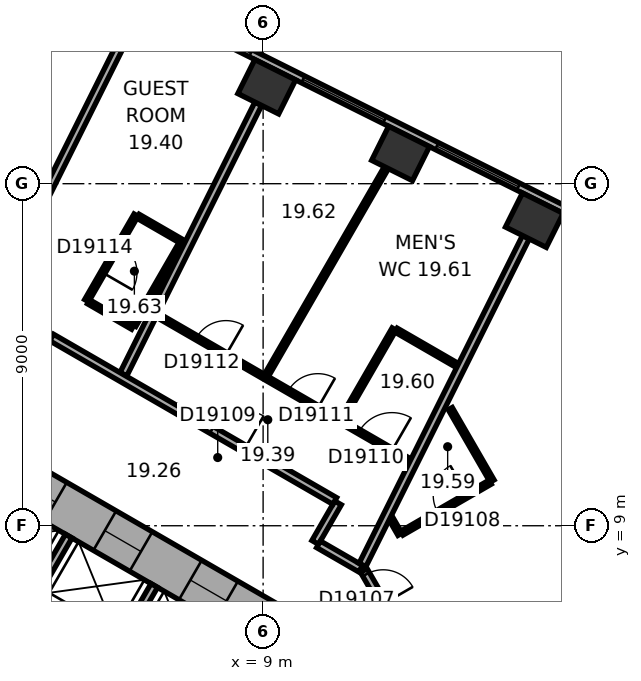
"""IFC4 building model, lengths in metres.
Left out: names, types, materials, properties, quantities, classifications, styles, units other than length and angle.
Written with IfcOpenShell. Run it as: python <this file> out.ifc"""

import sys

from ifc_helpers import new_model, si_unit, direction, frame, frame_2d, origin, origin_2d, place, context, subcontext, project, spatial, rectangle, extrude, element, fill, save


model = new_model("IFC4")
c1 = context("Model", 3, precision=1e-05, world=origin(), true_north=direction((0.0, 1.0)))
c2 = subcontext(c1, "Body", "Model", "MODEL_VIEW")
j1 = project(units=[si_unit("LENGTHUNIT", "METRE"), si_unit("PLANEANGLEUNIT", "RADIAN")], contexts=[c1])
p1 = place(None, origin())
s1 = spatial("IfcSite", under=j1, at=p1, CompositionType="ELEMENT")
p2 = place(p1, origin())
s2 = spatial("IfcBuilding", under=s1, at=p2, CompositionType="ELEMENT")
p3 = place(p2, frame((0.0, 0.0, 86.9)))
s3 = spatial("IfcBuildingStorey", under=s2, at=p3, CompositionType="ELEMENT", Elevation=86.9)
for number, where, z_axis, x_axis in (
    (1, (16.138, 17.04, 0.0), (0.0, 0.0, 1.0), (-0.895, 0.446, 0.0)),
    (2, (12.616, 18.795, 0.0), (0.0, 0.0, 1.0), (-0.895, 0.446, 0.0)),
    (3, (9.095, 20.551, 0.0), (0.0, 0.0, 1.0), (-0.895, 0.446, 0.0)),
):
    element("IfcColumn", number, at=place(p3, frame(where, z_axis=z_axis, x_axis=x_axis)), inside=s3, PredefinedType="COLUMN", context=c2, shape_type="SweptSolid", body=[
        extrude(rectangle(XDim=1.2, YDim=1.0, at=origin_2d()), origin(), (0.0, 0.0, 1.0), 3.3),
    ])
p4 = place(p3, frame((10.4, 5.658, 0.0), z_axis=(0.0, 0.0, 1.0), x_axis=(-0.866021384402, 0.500006961711, 0.0)))
e4 = element("IfcWall", 4, at=p4, inside=s3, PredefinedType="SHEAR", context=c2, shape_type="SweptSolid", body=[
    extrude(rectangle(XDim=12.355, YDim=1.2, at=frame_2d((6.178, 0.0))), origin(), (0.0, 0.0, 1.0), 3.3),
])
p5 = place(p4, frame((2.728, 0.0, 0.0)))
e5 = element("IfcOpeningElement", 5, at=p5, cuts=e4, PredefinedType="OPENING", context=c2, shape_type="SweptSolid", body=[
    extrude(rectangle(XDim=1.1, YDim=2.1, at=frame_2d((0.55, 1.05))), frame((0.0, 0.61, 0.0), z_axis=(0.0, -1.0, 0.0), x_axis=(1.0, 0.0, 0.0)), (0.0, 0.0, 1.0), 1.22),
])
p6 = place(p4, frame((5.328, 0.0, 0.0)))
e6 = element("IfcOpeningElement", 6, at=p6, cuts=e4, PredefinedType="OPENING", context=c2, shape_type="SweptSolid", body=[
    extrude(rectangle(XDim=1.1, YDim=2.1, at=frame_2d((0.55, 1.05))), frame((0.0, 0.61, 0.0), z_axis=(0.0, -1.0, 0.0), x_axis=(1.0, 0.0, 0.0)), (0.0, 0.0, 1.0), 1.22),
])
p7 = place(p4, frame((7.928, 0.0, 0.0)))
e7 = element("IfcOpeningElement", 7, at=p7, cuts=e4, PredefinedType="OPENING", context=c2, shape_type="SweptSolid", body=[
    extrude(rectangle(XDim=1.1, YDim=2.1, at=frame_2d((0.55, 1.05))), frame((0.0, 0.61, 0.0), z_axis=(0.0, -1.0, 0.0), x_axis=(1.0, 0.0, 0.0)), (0.0, 0.0, 1.0), 1.22),
])
p8 = place(p3, frame((20.63, 15.47, 0.0), z_axis=(0.0, 0.0, 1.0), x_axis=(-0.894934518609, 0.446197498203, 0.0)))
e8 = element("IfcWall", 8, at=p8, inside=s3, PredefinedType="STANDARD", context=c2, shape_type="SweptSolid", body=[
    extrude(rectangle(XDim=21.246, YDim=0.2, at=frame_2d((10.623, 0.0))), origin(), (0.0, 0.0, 1.0), 3.3),
])
p9 = place(p8, frame((1.553, 0.0, 0.8)))
e9 = element("IfcOpeningElement", 9, at=p9, cuts=e8, PredefinedType="OPENING", context=c2, shape_type="SweptSolid", body=[
    extrude(rectangle(XDim=2.4, YDim=1.7, at=frame_2d((1.2, 0.85))), frame((0.0, 0.11, 0.0), z_axis=(0.0, -1.0, 0.0), x_axis=(1.0, 0.0, 0.0)), (0.0, 0.0, 1.0), 0.22),
])
p10 = place(p8, frame((5.488, 0.0, 0.8)))
e10 = element("IfcOpeningElement", 10, at=p10, cuts=e8, PredefinedType="OPENING", context=c2, shape_type="SweptSolid", body=[
    extrude(rectangle(XDim=2.4, YDim=1.7, at=frame_2d((1.2, 0.85))), frame((0.0, 0.11, 0.0), z_axis=(0.0, -1.0, 0.0), x_axis=(1.0, 0.0, 0.0)), (0.0, 0.0, 1.0), 0.22),
])
p11 = place(p8, frame((9.422, 0.0, 0.8)))
e11 = element("IfcOpeningElement", 11, at=p11, cuts=e8, PredefinedType="OPENING", context=c2, shape_type="SweptSolid", body=[
    extrude(rectangle(XDim=2.4, YDim=1.7, at=frame_2d((1.2, 0.85))), frame((0.0, 0.11, 0.0), z_axis=(0.0, -1.0, 0.0), x_axis=(1.0, 0.0, 0.0)), (0.0, 0.0, 1.0), 0.22),
])
p12 = place(p8, frame((13.357, 0.0, 0.8)))
e12 = element("IfcOpeningElement", 12, at=p12, cuts=e8, PredefinedType="OPENING", context=c2, shape_type="SweptSolid", body=[
    extrude(rectangle(XDim=2.4, YDim=1.7, at=frame_2d((1.2, 0.85))), frame((0.0, 0.11, 0.0), z_axis=(0.0, -1.0, 0.0), x_axis=(1.0, 0.0, 0.0)), (0.0, 0.0, 1.0), 0.22),
])
p13 = place(p8, frame((17.292, 0.0, 0.8)))
e13 = element("IfcOpeningElement", 13, at=p13, cuts=e8, PredefinedType="OPENING", context=c2, shape_type="SweptSolid", body=[
    extrude(rectangle(XDim=2.4, YDim=1.7, at=frame_2d((1.2, 0.85))), frame((0.0, 0.11, 0.0), z_axis=(0.0, -1.0, 0.0), x_axis=(1.0, 0.0, 0.0)), (0.0, 0.0, 1.0), 0.22),
])
p14 = place(p3, frame((7.424, 4.259, 0.0), z_axis=(0.0, 0.0, 1.0), x_axis=(-0.866026010844, 0.49999894854, 0.0)))
e14 = element("IfcWall", 14, at=p14, inside=s3, PredefinedType="PARTITIONING", context=c2, shape_type="SweptSolid", body=[
    extrude(rectangle(XDim=8.0, YDim=0.2, at=frame_2d((4.0, 0.0))), origin(), (0.0, 0.0, 1.0), 3.05),
])
for number, where, z_axis, x_axis in (
    (15, (5.036, 5.522, 0.0), (0.0, 0.0, 1.0), (0.5, 0.866, 0.0)),
    (16, (2.784, 6.822, 0.0), (0.0, 0.0, 1.0), (0.5, 0.866, 0.0)),
):
    element("IfcWall", number, at=place(p3, frame(where, z_axis=z_axis, x_axis=x_axis)), inside=s3, PredefinedType="PARTITIONING", context=c2, shape_type="SweptSolid", body=[
        extrude(rectangle(XDim=2.2, YDim=0.2, at=frame_2d((1.1, 0.0))), origin(), (0.0, 0.0, 1.0), 3.05),
    ])
p15 = place(p3, frame((6.303, 4.617, 0.0), z_axis=(0.0, 0.0, 1.0), x_axis=(-0.866027801685, 0.499995846692, 0.0)))
e17 = element("IfcWall", 17, at=p15, inside=s3, PredefinedType="SHEAR", context=c2, shape_type="SweptSolid", body=[
    extrude(rectangle(XDim=7.06, YDim=0.3, at=frame_2d((3.53, 0.0))), origin(), (0.0, 0.0, 1.0), 3.05),
])
p16 = place(p3, frame((4.356, 14.922, 0.0), z_axis=(0.0, 0.0, 1.0), x_axis=(0.499936506574, 0.866062058628, 0.0)))
e18 = element("IfcWall", 18, at=p16, inside=s3, PredefinedType="PARTITIONING", context=c2, shape_type="SweptSolid", body=[
    extrude(rectangle(XDim=2.6, YDim=0.12, at=frame_2d((1.3, 0.0))), origin(), (0.0, 0.0, 1.0), 3.05),
])
p17 = place(p16, frame((0.85, 0.0, 0.0)))
e19 = element("IfcOpeningElement", 19, at=p17, cuts=e18, PredefinedType="OPENING", context=c2, shape_type="SweptSolid", body=[
    extrude(rectangle(XDim=0.9, YDim=2.1, at=frame_2d((0.45, 1.05))), frame((0.0, 0.07, 0.0), z_axis=(0.0, -1.0, 0.0), x_axis=(1.0, 0.0, 0.0)), (0.0, 0.0, 1.0), 0.14),
])
p18 = place(p3, frame((5.351, 21.859, 0.0), z_axis=(0.0, 0.0, 1.0), x_axis=(-0.446205309328, -0.894930624086, 0.0)))
e20 = element("IfcWall", 20, at=p18, inside=s3, PredefinedType="PARTITIONING", context=c2, shape_type="SweptSolid", body=[
    extrude(rectangle(XDim=8.913, YDim=0.2, at=frame_2d((4.457, 0.0))), origin(), (0.0, 0.0, 1.0), 2.6),
])
p19 = place(p3, frame((5.569, 14.222, 0.0), z_axis=(0.0, 0.0, 1.0), x_axis=(-0.866036909293, 0.499980071345, 0.0)))
e21 = element("IfcWall", 21, at=p19, inside=s3, PredefinedType="PARTITIONING", context=c2, shape_type="SweptSolid", body=[
    extrude(rectangle(XDim=1.34, YDim=0.12, at=frame_2d((0.67, 0.0))), origin(), (0.0, 0.0, 1.0), 3.05),
])
p20 = place(p3, frame((5.708, 17.144, 0.0), z_axis=(0.0, 0.0, 1.0), x_axis=(0.866082447003, -0.499901185229, 0.0)))
e22 = element("IfcWall", 22, at=p20, inside=s3, PredefinedType="PARTITIONING", context=c2, shape_type="SweptSolid", body=[
    extrude(rectangle(XDim=1.34, YDim=0.12, at=frame_2d((0.67, 0.0))), origin(), (0.0, 0.0, 1.0), 3.05),
])
p21 = place(p3, frame((6.839, 16.422, 0.0), z_axis=(0.0, 0.0, 1.0), x_axis=(-0.50000366821, -0.866023285932, 0.0)))
e23 = element("IfcWall", 23, at=p21, inside=s3, PredefinedType="PARTITIONING", context=c2, shape_type="SweptSolid", body=[
    extrude(rectangle(XDim=2.48, YDim=0.12, at=frame_2d((1.24, 0.0))), origin(), (0.0, 0.0, 1.0), 3.05),
])
p22 = place(p3, frame((8.872, 20.104, 0.0), z_axis=(0.0, 0.0, 1.0), x_axis=(-0.446218378653, -0.894924107706, 0.0)))
e24 = element("IfcWall", 24, at=p22, inside=s3, PredefinedType="PARTITIONING", context=c2, shape_type="SweptSolid", body=[
    extrude(rectangle(XDim=7.95, YDim=0.2, at=frame_2d((3.975, 0.0))), origin(), (0.0, 0.0, 1.0), 3.05),
])
p23 = place(p3, frame((10.371, 8.561, 0.0), z_axis=(0.0, 0.0, 1.0), x_axis=(0.499986357472, 0.866033280158, 0.0)))
e25 = element("IfcWall", 25, at=p23, inside=s3, PredefinedType="PARTITIONING", context=c2, shape_type="SweptSolid", body=[
    extrude(rectangle(XDim=1.201, YDim=0.2, at=frame_2d((0.601, 0.0))), origin(), (0.0, 0.0, 1.0), 3.05),
])
p24 = place(p3, frame((10.885, 9.652, 0.0), z_axis=(0.0, 0.0, 1.0), x_axis=(-0.866033868542, 0.499985338323, 0.0)))
e26 = element("IfcWall", 26, at=p24, inside=s3, PredefinedType="PARTITIONING", context=c2, shape_type="SweptSolid", body=[
    extrude(rectangle(XDim=8.602, YDim=0.2, at=frame_2d((4.301, 0.0))), origin(), (0.0, 0.0, 1.0), 3.05),
])
p25 = place(p24, frame((2.739, 0.0, 0.0)))
e27 = element("IfcOpeningElement", 27, at=p25, cuts=e26, PredefinedType="OPENING", context=c2, shape_type="SweptSolid", body=[
    extrude(rectangle(XDim=1.0, YDim=2.1, at=frame_2d((0.5, 1.05))), frame((0.0, 0.11, 0.0), z_axis=(0.0, -1.0, 0.0), x_axis=(1.0, 0.0, 0.0)), (0.0, 0.0, 1.0), 0.22),
])
p26 = place(p3, frame((11.566, 7.871, 0.0), z_axis=(0.0, 0.0, 1.0), x_axis=(-0.866004557827, 0.500036104519, 0.0)))
e28 = element("IfcWall", 28, at=p26, inside=s3, PredefinedType="PARTITIONING", context=c2, shape_type="SweptSolid", body=[
    extrude(rectangle(XDim=1.28, YDim=0.2, at=frame_2d((0.64, 0.0))), origin(), (0.0, 0.0, 1.0), 3.05),
])
p27 = place(p3, frame((12.243, 18.423, 0.0), z_axis=(0.0, 0.0, 1.0), x_axis=(-0.499993523031, -0.866029143232, 0.0)))
e29 = element("IfcWall", 29, at=p27, inside=s3, PredefinedType="PARTITIONING", context=c2, shape_type="SweptSolid", body=[
    extrude(rectangle(XDim=6.315, YDim=0.12, at=frame_2d((3.157, 0.0))), origin(), (0.0, 0.0, 1.0), 2.6),
])
p28 = place(p3, frame((12.448, 14.177, 0.0), z_axis=(0.0, 0.0, 1.0), x_axis=(-0.500048966069, -0.865997131366, 0.0)))
e30 = element("IfcWall", 30, at=p28, inside=s3, PredefinedType="PARTITIONING", context=c2, shape_type="SweptSolid", body=[
    extrude(rectangle(XDim=2.74, YDim=0.12, at=frame_2d((1.37, 0.0))), origin(), (0.0, 0.0, 1.0), 3.05),
])
p29 = place(p3, frame((12.58, 6.212, 0.0), z_axis=(0.0, 0.0, 1.0), x_axis=(-0.500063286585, 0.865988862174, 0.0)))
e31 = element("IfcWall", 31, at=p29, inside=s3, PredefinedType="PARTITIONING", context=c2, shape_type="SweptSolid", body=[
    extrude(rectangle(XDim=1.86, YDim=0.2, at=frame_2d((0.93, 0.0))), origin(), (0.0, 0.0, 1.0), 3.05),
])
p30 = place(p29, frame((0.842, 0.0, 0.0)))
e32 = element("IfcOpeningElement", 32, at=p30, cuts=e31, PredefinedType="OPENING", context=c2, shape_type="SweptSolid", body=[
    extrude(rectangle(XDim=0.9, YDim=2.1, at=frame_2d((0.45, 1.05))), frame((0.0, 0.11, 0.0), z_axis=(0.0, -1.0, 0.0), x_axis=(1.0, 0.0, 0.0)), (0.0, 0.0, 1.0), 0.22),
])
p31 = place(p3, frame((12.601, 8.776, 0.0), z_axis=(0.0, 0.0, 1.0), x_axis=(-0.500166486798, 0.865929261247, 0.0)))
e33 = element("IfcWall", 33, at=p31, inside=s3, PredefinedType="PARTITIONING", context=c2, shape_type="SweptSolid", body=[
    extrude(rectangle(XDim=0.476, YDim=0.12, at=frame_2d((0.238, 0.0))), origin(), (0.0, 0.0, 1.0), 3.05),
])
p32 = place(p3, frame((12.866, 10.702, 0.0), z_axis=(0.0, 0.0, 1.0), x_axis=(-0.866023151433, 0.500003901167, 0.0)))
e34 = element("IfcWall", 34, at=p32, inside=s3, PredefinedType="PARTITIONING", context=c2, shape_type="SweptSolid", body=[
    extrude(rectangle(XDim=7.684, YDim=0.12, at=frame_2d((3.842, 0.0))), origin(), (0.0, 0.0, 1.0), 3.05),
])
p33 = place(p32, frame((0.55, 0.0, 0.0)))
e35 = element("IfcOpeningElement", 35, at=p33, cuts=e34, PredefinedType="OPENING", context=c2, shape_type="SweptSolid", body=[
    extrude(rectangle(XDim=1.0, YDim=2.1, at=frame_2d((0.5, 1.05))), frame((0.0, 0.07, 0.0), z_axis=(0.0, -1.0, 0.0), x_axis=(1.0, 0.0, 0.0)), (0.0, 0.0, 1.0), 0.14),
])
p34 = place(p32, frame((2.8, 0.0, 0.0)))
e36 = element("IfcOpeningElement", 36, at=p34, cuts=e34, PredefinedType="OPENING", context=c2, shape_type="SweptSolid", body=[
    extrude(rectangle(XDim=0.9, YDim=2.1, at=frame_2d((0.45, 1.05))), frame((0.0, 0.07, 0.0), z_axis=(0.0, -1.0, 0.0), x_axis=(1.0, 0.0, 0.0)), (0.0, 0.0, 1.0), 0.14),
])
p35 = place(p32, frame((5.592, 0.0, 0.0)))
e37 = element("IfcOpeningElement", 37, at=p35, cuts=e34, PredefinedType="OPENING", context=c2, shape_type="SweptSolid", body=[
    extrude(rectangle(XDim=0.9, YDim=2.1, at=frame_2d((0.45, 1.05))), frame((0.0, 0.07, 0.0), z_axis=(0.0, -1.0, 0.0), x_axis=(1.0, 0.0, 0.0)), (0.0, 0.0, 1.0), 0.14),
])
p36 = place(p3, frame((13.926, 12.081, 0.0), z_axis=(0.0, 0.0, 1.0), x_axis=(0.499994660107, -0.866028486751, 0.0)))
e38 = element("IfcWall", 38, at=p36, inside=s3, PredefinedType="PARTITIONING", context=c2, shape_type="SweptSolid", body=[
    extrude(rectangle(XDim=2.2, YDim=0.12, at=frame_2d((1.1, 0.0))), origin(), (0.0, 0.0, 1.0), 3.05),
])
p37 = place(p3, frame((14.118, 13.212, 0.0), z_axis=(0.0, 0.0, 1.0), x_axis=(-0.866039825209, 0.499975020527, 0.0)))
e39 = element("IfcWall", 39, at=p37, inside=s3, PredefinedType="PARTITIONING", context=c2, shape_type="SweptSolid", body=[
    extrude(rectangle(XDim=1.869, YDim=0.12, at=frame_2d((0.934, 0.0))), origin(), (0.0, 0.0, 1.0), 3.05),
])
p38 = place(p3, frame((14.974, 10.146, 0.0), z_axis=(0.0, 0.0, 1.0), x_axis=(-0.86599746015, -0.500048396672, 0.0)))
e40 = element("IfcWall", 40, at=p38, inside=s3, PredefinedType="PARTITIONING", context=c2, shape_type="SweptSolid", body=[
    extrude(rectangle(XDim=2.68, YDim=0.12, at=frame_2d((1.34, 0.0))), origin(), (0.0, 0.0, 1.0), 3.05),
])
p39 = place(p38, frame((0.69, 0.0, 0.0)))
e41 = element("IfcOpeningElement", 41, at=p39, cuts=e40, PredefinedType="OPENING", context=c2, shape_type="SweptSolid", body=[
    extrude(rectangle(XDim=0.9, YDim=2.1, at=frame_2d((0.45, 1.05))), frame((0.0, 0.07, 0.0), z_axis=(0.0, -1.0, 0.0), x_axis=(1.0, 0.0, 0.0)), (0.0, 0.0, 1.0), 0.14),
])
p40 = place(p3, frame((15.915, 16.592, 0.0), z_axis=(0.0, 0.0, 1.0), x_axis=(-0.446199736347, -0.894933402709, 0.0)))
e42 = element("IfcWall", 42, at=p40, inside=s3, PredefinedType="PARTITIONING", context=c2, shape_type="SweptSolid", body=[
    extrude(rectangle(XDim=9.635, YDim=0.2, at=frame_2d((4.817, 0.0))), origin(), (0.0, 0.0, 1.0), 3.05),
])
p41 = place(p10, origin())
e43 = element("IfcWindow", 43, at=p41, inside=s3, PartitioningType="SINGLE_PANEL", PredefinedType="WINDOW", context=c2, shape_type="SweptSolid", body=[
    extrude(rectangle(XDim=2.4, YDim=1.7, at=frame_2d((1.2, 0.85))), frame((0.0, 0.03, 0.0), z_axis=(0.0, -1.0, 0.0), x_axis=(1.0, 0.0, 0.0)), (0.0, 0.0, 1.0), 0.06),
])
fill(e10, e43)
p42 = place(p11, origin())
e44 = element("IfcWindow", 44, at=p42, inside=s3, PartitioningType="SINGLE_PANEL", PredefinedType="WINDOW", context=c2, shape_type="SweptSolid", body=[
    extrude(rectangle(XDim=2.4, YDim=1.7, at=frame_2d((1.2, 0.85))), frame((0.0, 0.03, 0.0), z_axis=(0.0, -1.0, 0.0), x_axis=(1.0, 0.0, 0.0)), (0.0, 0.0, 1.0), 0.06),
])
fill(e11, e44)
p43 = place(p12, origin())
e45 = element("IfcWindow", 45, at=p43, inside=s3, PartitioningType="SINGLE_PANEL", PredefinedType="WINDOW", context=c2, shape_type="SweptSolid", body=[
    extrude(rectangle(XDim=2.4, YDim=1.7, at=frame_2d((1.2, 0.85))), frame((0.0, 0.03, 0.0), z_axis=(0.0, -1.0, 0.0), x_axis=(1.0, 0.0, 0.0)), (0.0, 0.0, 1.0), 0.06),
])
fill(e12, e45)
p44 = place(p5, origin())
e46 = element("IfcDoor", 46, at=p44, inside=s3, OperationType="DOUBLE_DOOR_SLIDING", PredefinedType="DOOR", context=c2, shape_type="SweptSolid", body=[
    extrude(rectangle(XDim=1.1, YDim=2.1, at=frame_2d((0.55, 1.05))), frame((0.0, 0.025, 0.0), z_axis=(0.0, -1.0, 0.0), x_axis=(1.0, 0.0, 0.0)), (0.0, 0.0, 1.0), 0.05),
])
fill(e5, e46)
p45 = place(p6, origin())
e47 = element("IfcDoor", 47, at=p45, inside=s3, OperationType="DOUBLE_DOOR_SLIDING", PredefinedType="DOOR", context=c2, shape_type="SweptSolid", body=[
    extrude(rectangle(XDim=1.1, YDim=2.1, at=frame_2d((0.55, 1.05))), frame((0.0, 0.025, 0.0), z_axis=(0.0, -1.0, 0.0), x_axis=(1.0, 0.0, 0.0)), (0.0, 0.0, 1.0), 0.05),
])
fill(e6, e47)
p46 = place(p7, origin())
e48 = element("IfcDoor", 48, at=p46, inside=s3, OperationType="DOUBLE_DOOR_SLIDING", PredefinedType="DOOR", context=c2, shape_type="SweptSolid", body=[
    extrude(rectangle(XDim=1.1, YDim=2.1, at=frame_2d((0.55, 1.05))), frame((0.0, 0.025, 0.0), z_axis=(0.0, -1.0, 0.0), x_axis=(1.0, 0.0, 0.0)), (0.0, 0.0, 1.0), 0.05),
])
fill(e7, e48)
p47 = place(p30, origin())
e49 = element("IfcDoor", 49, at=p47, inside=s3, OperationType="SINGLE_SWING_LEFT", PredefinedType="DOOR", context=c2, shape_type="SweptSolid", body=[
    extrude(rectangle(XDim=0.9, YDim=2.1, at=frame_2d((0.45, 1.05))), frame((0.0, 0.025, 0.0), z_axis=(0.0, -1.0, 0.0), x_axis=(1.0, 0.0, 0.0)), (0.0, 0.0, 1.0), 0.05),
])
fill(e32, e49)
p48 = place(p39, origin())
e50 = element("IfcDoor", 50, at=p48, inside=s3, OperationType="SINGLE_SWING_LEFT", PredefinedType="DOOR", context=c2, shape_type="SweptSolid", body=[
    extrude(rectangle(XDim=0.9, YDim=2.1, at=frame_2d((0.45, 1.05))), frame((0.0, 0.025, 0.0), z_axis=(0.0, -1.0, 0.0), x_axis=(1.0, 0.0, 0.0)), (0.0, 0.0, 1.0), 0.05),
])
fill(e41, e50)
p49 = place(p25, origin())
e51 = element("IfcDoor", 51, at=p49, inside=s3, OperationType="SINGLE_SWING_LEFT", PredefinedType="DOOR", context=c2, shape_type="SweptSolid", body=[
    extrude(rectangle(XDim=1.0, YDim=2.1, at=frame_2d((0.5, 1.05))), frame((0.0, 0.025, 0.0), z_axis=(0.0, -1.0, 0.0), x_axis=(1.0, 0.0, 0.0)), (0.0, 0.0, 1.0), 0.05),
])
fill(e27, e51)
p50 = place(p33, origin())
e52 = element("IfcDoor", 52, at=p50, inside=s3, OperationType="SINGLE_SWING_LEFT", PredefinedType="DOOR", context=c2, shape_type="SweptSolid", body=[
    extrude(rectangle(XDim=1.0, YDim=2.1, at=frame_2d((0.5, 1.05))), frame((0.0, 0.025, 0.0), z_axis=(0.0, -1.0, 0.0), x_axis=(1.0, 0.0, 0.0)), (0.0, 0.0, 1.0), 0.05),
])
fill(e35, e52)
p51 = place(p34, origin())
e53 = element("IfcDoor", 53, at=p51, inside=s3, OperationType="SINGLE_SWING_LEFT", PredefinedType="DOOR", context=c2, shape_type="SweptSolid", body=[
    extrude(rectangle(XDim=0.9, YDim=2.1, at=frame_2d((0.45, 1.05))), frame((0.0, 0.025, 0.0), z_axis=(0.0, -1.0, 0.0), x_axis=(1.0, 0.0, 0.0)), (0.0, 0.0, 1.0), 0.05),
])
fill(e36, e53)
p52 = place(p35, origin())
e54 = element("IfcDoor", 54, at=p52, inside=s3, OperationType="SINGLE_SWING_LEFT", PredefinedType="DOOR", context=c2, shape_type="SweptSolid", body=[
    extrude(rectangle(XDim=0.9, YDim=2.1, at=frame_2d((0.45, 1.05))), frame((0.0, 0.025, 0.0), z_axis=(0.0, -1.0, 0.0), x_axis=(1.0, 0.0, 0.0)), (0.0, 0.0, 1.0), 0.05),
])
fill(e37, e54)
p53 = place(p17, origin())
e55 = element("IfcDoor", 55, at=p53, inside=s3, OperationType="SINGLE_SWING_LEFT", PredefinedType="DOOR", context=c2, shape_type="SweptSolid", body=[
    extrude(rectangle(XDim=0.9, YDim=2.1, at=frame_2d((0.45, 1.05))), frame((0.0, 0.025, 0.0), z_axis=(0.0, -1.0, 0.0), x_axis=(1.0, 0.0, 0.0)), (0.0, 0.0, 1.0), 0.05),
])
fill(e19, e55)
save(model, sys.argv[1])
